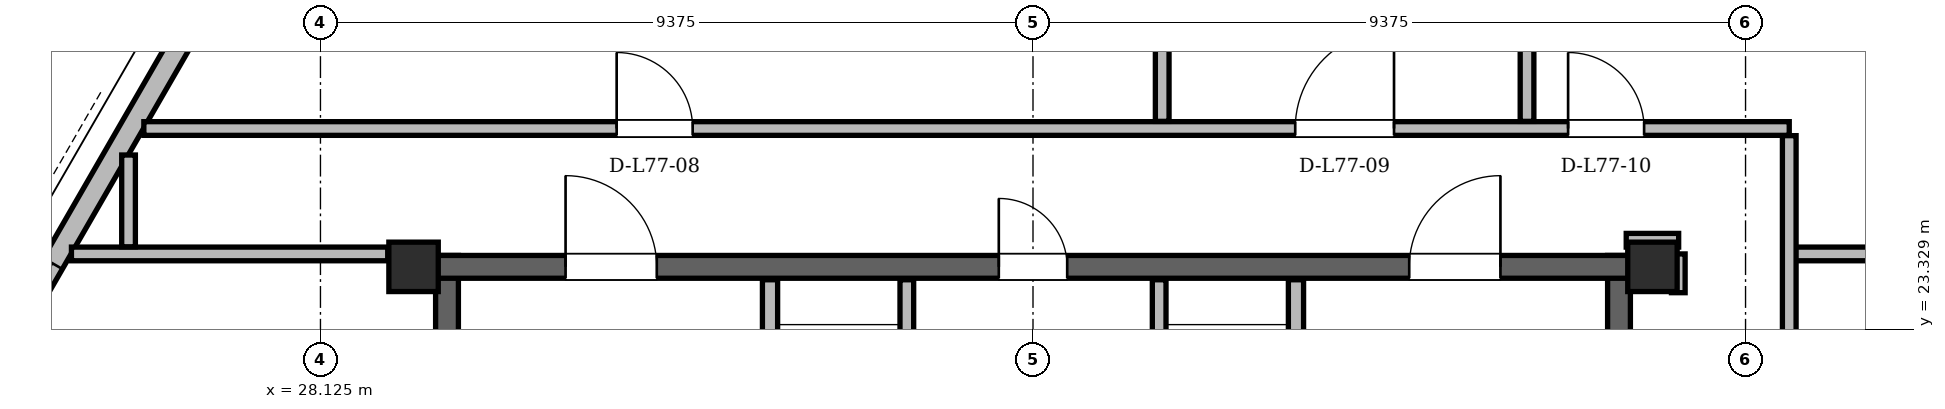
"""IFC4 building model, lengths in metres.
Left out: names, types, materials, properties, quantities, classifications, styles, units other than length and angle.
Written with IfcOpenShell. Run it as: python <this file> out.ifc"""

import sys

from ifc_helpers import new_model, si_unit, direction, frame, frame_2d, origin, origin_2d, place, context, subcontext, project, spatial, rectangle, hollow_rectangle, extrude, element, fill, save


model = new_model("IFC4")
c1 = context("Model", 3, precision=1e-05, world=origin(), true_north=direction((0.0, 1.0)))
c2 = subcontext(c1, "Body", "Model", "MODEL_VIEW")
j1 = project(units=[si_unit("LENGTHUNIT", "METRE"), si_unit("PLANEANGLEUNIT", "RADIAN")], contexts=[c1])
p1 = place(None, origin())
s1 = spatial("IfcSite", under=j1, at=p1, CompositionType="ELEMENT")
p2 = place(p1, origin())
s2 = spatial("IfcBuilding", under=s1, at=p2, CompositionType="ELEMENT")
p3 = place(p2, frame((0.0, 0.0, 292.8)))
s3 = spatial("IfcBuildingStorey", under=s2, at=p3, CompositionType="ELEMENT", Elevation=292.8)
for number, where, z_axis, x_axis in (
    (1, (45.65, 24.15, 0.0), (0.0, 0.0, 1.0), (1.0, 0.0, 0.0)),
    (2, (29.35, 24.15, 0.0), (0.0, 0.0, 1.0), (1.0, 0.0, 0.0)),
):
    element("IfcColumn", number, at=place(p3, frame(where, z_axis=z_axis, x_axis=x_axis)), inside=s3, PredefinedType="COLUMN", context=c2, shape_type="SweptSolid", body=[
        extrude(hollow_rectangle(XDim=0.65, YDim=0.65, WallThickness=0.05, at=origin_2d()), origin(), (0.0, 0.0, 1.0), 3.9),
    ])
for number, where, z_axis, x_axis in (
    (3, (29.79, 11.0, 0.0), (0.0, 0.0, 1.0), (0.0, 1.0, 0.0)),
    (4, (45.21, 11.0, 0.0), (0.0, 0.0, 1.0), (0.0, 1.0, 0.0)),
):
    element("IfcWall", number, at=place(p3, frame(where, z_axis=z_axis, x_axis=x_axis)), inside=s3, PredefinedType="SHEAR", context=c2, shape_type="SweptSolid", body=[
        extrude(rectangle(XDim=13.3, YDim=0.3, at=frame_2d((6.65, 0.0))), origin(), (0.0, 0.0, 1.0), 3.68),
    ])
p4 = place(p3, frame((29.65, 24.15, 0.0), z_axis=(0.0, 0.0, 1.0), x_axis=(1.0, 0.0, 0.0)))
e5 = element("IfcWall", 5, at=p4, inside=s3, PredefinedType="SHEAR", context=c2, shape_type="SweptSolid", body=[
    extrude(rectangle(XDim=15.7, YDim=0.3, at=frame_2d((7.85, 0.0))), origin(), (0.0, 0.0, 1.0), 3.68),
])
p5 = place(p4, frame((1.7, 0.0, 0.0)))
e6 = element("IfcOpeningElement", 6, at=p5, cuts=e5, PredefinedType="OPENING", context=c2, shape_type="SweptSolid", body=[
    extrude(rectangle(XDim=1.2, YDim=2.2, at=frame_2d((0.6, 1.1))), frame((0.0, 0.15, 0.0), z_axis=(0.0, -1.0, 0.0), x_axis=(1.0, 0.0, 0.0)), (0.0, 0.0, 1.0), 0.3),
])
p6 = place(p4, frame((12.8, 0.0, 0.0)))
e7 = element("IfcOpeningElement", 7, at=p6, cuts=e5, PredefinedType="OPENING", context=c2, shape_type="SweptSolid", body=[
    extrude(rectangle(XDim=1.2, YDim=2.2, at=frame_2d((0.6, 1.1))), frame((0.0, 0.15, 0.0), z_axis=(0.0, -1.0, 0.0), x_axis=(1.0, 0.0, 0.0)), (0.0, 0.0, 1.0), 0.3),
])
p7 = place(p4, frame((7.4, 0.0, 0.0)))
e8 = element("IfcOpeningElement", 8, at=p7, cuts=e5, PredefinedType="OPENING", context=c2, shape_type="SweptSolid", body=[
    extrude(rectangle(XDim=0.9, YDim=2.05, at=frame_2d((0.45, 1.025))), frame((0.0, 0.15, 0.0), z_axis=(0.0, -1.0, 0.0), x_axis=(1.0, 0.0, 0.0)), (0.0, 0.0, 1.0), 0.3),
])
p8 = place(p3, frame((58.337, 10.439, 0.0), z_axis=(0.0, 0.0, 1.0), x_axis=(-0.499999767403, 0.866025538074, 0.0)))
e9 = element("IfcWall", 9, at=p8, inside=s3, PredefinedType="SOLIDWALL", context=c2, shape_type="SweptSolid", body=[
    extrude(rectangle(XDim=37.57, YDim=0.29, at=frame_2d((18.785, 0.0))), origin(), (0.0, 0.0, 1.0), 3.058),
])
p9 = place(p8, frame((8.034, 0.0, 0.0)))
e10 = element("IfcOpeningElement", 10, at=p9, cuts=e9, PredefinedType="OPENING", context=c2, shape_type="SweptSolid", body=[
    extrude(rectangle(XDim=1.5, YDim=2.2, at=frame_2d((0.75, 1.1))), frame((0.0, 0.145, 0.0), z_axis=(0.0, -1.0, 0.0), x_axis=(1.0, 0.0, 0.0)), (0.0, 0.0, 1.0), 0.29),
])
p10 = place(p8, frame((32.531, 0.0, 0.0)))
e11 = element("IfcOpeningElement", 11, at=p10, cuts=e9, PredefinedType="OPENING", context=c2, shape_type="SweptSolid", body=[
    extrude(rectangle(XDim=1.3, YDim=2.2, at=frame_2d((0.65, 1.1))), frame((0.0, 0.145, 0.0), z_axis=(0.0, -1.0, 0.0), x_axis=(1.0, 0.0, 0.0)), (0.0, 0.0, 1.0), 0.29),
])
p11 = place(p8, frame((0.916, 0.0, 0.85)))
e12 = element("IfcOpeningElement", 12, at=p11, cuts=e9, PredefinedType="OPENING", context=c2, shape_type="SweptSolid", body=[
    extrude(rectangle(XDim=1.2, YDim=1.48, at=frame_2d((0.6, 0.74))), frame((0.0, 0.145, 0.0), z_axis=(0.0, -1.0, 0.0), x_axis=(1.0, 0.0, 0.0)), (0.0, 0.0, 1.0), 0.29),
])
p12 = place(p8, frame((13.243, 0.0, 0.85)))
e13 = element("IfcOpeningElement", 13, at=p12, cuts=e9, PredefinedType="OPENING", context=c2, shape_type="SweptSolid", body=[
    extrude(rectangle(XDim=1.6, YDim=1.7, at=frame_2d((0.8, 0.85))), frame((0.0, 0.145, 0.0), z_axis=(0.0, -1.0, 0.0), x_axis=(1.0, 0.0, 0.0)), (0.0, 0.0, 1.0), 0.29),
])
p13 = place(p8, frame((2.444, 0.0, 0.85)))
e14 = element("IfcOpeningElement", 14, at=p13, cuts=e9, PredefinedType="OPENING", context=c2, shape_type="SweptSolid", body=[
    extrude(rectangle(XDim=1.2, YDim=1.48, at=frame_2d((0.6, 0.74))), frame((0.0, 0.145, 0.0), z_axis=(0.0, -1.0, 0.0), x_axis=(1.0, 0.0, 0.0)), (0.0, 0.0, 1.0), 0.29),
])
p14 = place(p8, frame((35.19, 0.0, 0.85)))
e15 = element("IfcOpeningElement", 15, at=p14, cuts=e9, PredefinedType="OPENING", context=c2, shape_type="SweptSolid", body=[
    extrude(rectangle(XDim=1.2, YDim=1.48, at=frame_2d((0.6, 0.74))), frame((0.0, 0.145, 0.0), z_axis=(0.0, -1.0, 0.0), x_axis=(1.0, 0.0, 0.0)), (0.0, 0.0, 1.0), 0.29),
])
p15 = place(p8, frame((17.528, 0.0, 0.85)))
e16 = element("IfcOpeningElement", 16, at=p15, cuts=e9, PredefinedType="OPENING", context=c2, shape_type="SweptSolid", body=[
    extrude(rectangle(XDim=2.5, YDim=2.098, at=frame_2d((1.25, 1.049))), frame((0.0, 0.145, 0.0), z_axis=(0.0, -1.0, 0.0), x_axis=(1.0, 0.0, 0.0)), (0.0, 0.0, 1.0), 0.29),
])
p16 = place(p8, frame((27.565, 0.0, 0.85)))
e17 = element("IfcOpeningElement", 17, at=p16, cuts=e9, PredefinedType="OPENING", context=c2, shape_type="SweptSolid", body=[
    extrude(rectangle(XDim=1.2, YDim=1.48, at=frame_2d((0.6, 0.74))), frame((0.0, 0.145, 0.0), z_axis=(0.0, -1.0, 0.0), x_axis=(1.0, 0.0, 0.0)), (0.0, 0.0, 1.0), 0.29),
])
p17 = place(p3, frame((35.448, 42.976, 0.0), z_axis=(0.0, 0.0, 1.0), x_axis=(-0.499999767403, -0.866025538074, 0.0)))
e18 = element("IfcWall", 18, at=p17, inside=s3, PredefinedType="SOLIDWALL", context=c2, shape_type="SweptSolid", body=[
    extrude(rectangle(XDim=37.57, YDim=0.29, at=frame_2d((18.785, 0.0))), origin(), (0.0, 0.0, 1.0), 3.058),
])
p18 = place(p17, frame((8.034, 0.0, 0.0)))
e19 = element("IfcOpeningElement", 19, at=p18, cuts=e18, PredefinedType="OPENING", context=c2, shape_type="SweptSolid", body=[
    extrude(rectangle(XDim=1.5, YDim=2.2, at=frame_2d((0.75, 1.1))), frame((0.0, 0.145, 0.0), z_axis=(0.0, -1.0, 0.0), x_axis=(1.0, 0.0, 0.0)), (0.0, 0.0, 1.0), 0.29),
])
p19 = place(p17, frame((32.431, 0.0, 0.0)))
e20 = element("IfcOpeningElement", 20, at=p19, cuts=e18, PredefinedType="OPENING", context=c2, shape_type="SweptSolid", body=[
    extrude(rectangle(XDim=1.5, YDim=2.2, at=frame_2d((0.75, 1.1))), frame((0.0, 0.145, 0.0), z_axis=(0.0, -1.0, 0.0), x_axis=(1.0, 0.0, 0.0)), (0.0, 0.0, 1.0), 0.29),
])
p20 = place(p17, frame((27.302, 0.0, 0.85)))
e21 = element("IfcOpeningElement", 21, at=p20, cuts=e18, PredefinedType="OPENING", context=c2, shape_type="SweptSolid", body=[
    extrude(rectangle(XDim=2.2, YDim=1.85, at=frame_2d((1.1, 0.925))), frame((0.0, 0.145, 0.0), z_axis=(0.0, -1.0, 0.0), x_axis=(1.0, 0.0, 0.0)), (0.0, 0.0, 1.0), 0.29),
])
p21 = place(p17, frame((34.367, 0.0, 0.85)))
e22 = element("IfcOpeningElement", 22, at=p21, cuts=e18, PredefinedType="OPENING", context=c2, shape_type="SweptSolid", body=[
    extrude(rectangle(XDim=1.6, YDim=1.7, at=frame_2d((0.8, 0.85))), frame((0.0, 0.145, 0.0), z_axis=(0.0, -1.0, 0.0), x_axis=(1.0, 0.0, 0.0)), (0.0, 0.0, 1.0), 0.29),
])
p22 = place(p17, frame((21.688, 0.0, 0.85)))
e23 = element("IfcOpeningElement", 23, at=p22, cuts=e18, PredefinedType="OPENING", context=c2, shape_type="SweptSolid", body=[
    extrude(rectangle(XDim=1.2, YDim=1.48, at=frame_2d((0.6, 0.74))), frame((0.0, 0.145, 0.0), z_axis=(0.0, -1.0, 0.0), x_axis=(1.0, 0.0, 0.0)), (0.0, 0.0, 1.0), 0.29),
])
p23 = place(p17, frame((23.938, 0.0, 0.85)))
e24 = element("IfcOpeningElement", 24, at=p23, cuts=e18, PredefinedType="OPENING", context=c2, shape_type="SweptSolid", body=[
    extrude(rectangle(XDim=1.4, YDim=1.6, at=frame_2d((0.7, 0.8))), frame((0.0, 0.145, 0.0), z_axis=(0.0, -1.0, 0.0), x_axis=(1.0, 0.0, 0.0)), (0.0, 0.0, 1.0), 0.29),
])
p24 = place(p17, frame((15.363, 0.0, 0.85)))
e25 = element("IfcOpeningElement", 25, at=p24, cuts=e18, PredefinedType="OPENING", context=c2, shape_type="SweptSolid", body=[
    extrude(rectangle(XDim=2.4, YDim=1.9, at=frame_2d((1.2, 0.95))), frame((0.0, 0.145, 0.0), z_axis=(0.0, -1.0, 0.0), x_axis=(1.0, 0.0, 0.0)), (0.0, 0.0, 1.0), 0.29),
])
p25 = place(p17, frame((1.165, 0.0, 0.85)))
e26 = element("IfcOpeningElement", 26, at=p25, cuts=e18, PredefinedType="OPENING", context=c2, shape_type="SweptSolid", body=[
    extrude(rectangle(XDim=1.2, YDim=1.48, at=frame_2d((0.6, 0.74))), frame((0.0, 0.145, 0.0), z_axis=(0.0, -1.0, 0.0), x_axis=(1.0, 0.0, 0.0)), (0.0, 0.0, 1.0), 0.29),
])
p26 = place(p3, frame((34.04, 19.48, 0.0), z_axis=(0.0, 0.0, 1.0), x_axis=(0.0, 1.0, 0.0)))
e27 = element("IfcWall", 27, at=p26, inside=s3, PredefinedType="PARTITIONING", context=c2, shape_type="SweptSolid", body=[
    extrude(rectangle(XDim=4.5, YDim=0.2, at=frame_2d((2.25, 0.0))), origin(), (0.0, 0.0, 1.0), 3.68),
])
p27 = place(p26, frame((2.12, 0.0, 0.0)))
e28 = element("IfcOpeningElement", 28, at=p27, cuts=e27, PredefinedType="OPENING", context=c2, shape_type="SweptSolid", body=[
    extrude(rectangle(XDim=1.1, YDim=2.2, at=frame_2d((0.55, 1.1))), frame((0.0, 0.1, 0.0), z_axis=(0.0, -1.0, 0.0), x_axis=(1.0, 0.0, 0.0)), (0.0, 0.0, 1.0), 0.2),
])
p28 = place(p3, frame((35.84, 20.96, 0.0), z_axis=(0.0, 0.0, 1.0), x_axis=(0.0, 1.0, 0.0)))
e29 = element("IfcWall", 29, at=p28, inside=s3, PredefinedType="PARTITIONING", context=c2, shape_type="SweptSolid", body=[
    extrude(rectangle(XDim=3.02, YDim=0.18, at=frame_2d((1.51, 0.0))), origin(), (0.0, 0.0, 1.0), 3.68),
])
p29 = place(p3, frame((40.96, 19.48, 0.0), z_axis=(0.0, 0.0, 1.0), x_axis=(0.0, 1.0, 0.0)))
e30 = element("IfcWall", 30, at=p29, inside=s3, PredefinedType="PARTITIONING", context=c2, shape_type="SweptSolid", body=[
    extrude(rectangle(XDim=4.5, YDim=0.2, at=frame_2d((2.25, 0.0))), origin(), (0.0, 0.0, 1.0), 3.68),
])
p30 = place(p29, frame((2.12, 0.0, 0.0)))
e31 = element("IfcOpeningElement", 31, at=p30, cuts=e30, PredefinedType="OPENING", context=c2, shape_type="SweptSolid", body=[
    extrude(rectangle(XDim=1.1, YDim=2.2, at=frame_2d((0.55, 1.1))), frame((0.0, 0.1, 0.0), z_axis=(0.0, -1.0, 0.0), x_axis=(1.0, 0.0, 0.0)), (0.0, 0.0, 1.0), 0.2),
])
p31 = place(p3, frame((39.16, 20.96, 0.0), z_axis=(0.0, 0.0, 1.0), x_axis=(0.0, 1.0, 0.0)))
e32 = element("IfcWall", 32, at=p31, inside=s3, PredefinedType="PARTITIONING", context=c2, shape_type="SweptSolid", body=[
    extrude(rectangle(XDim=3.02, YDim=0.18, at=frame_2d((1.51, 0.0))), origin(), (0.0, 0.0, 1.0), 3.68),
])
p32 = place(p3, frame((24.849, 24.32, 0.0), z_axis=(0.0, 0.0, 1.0), x_axis=(1.0, 0.0, 0.0)))
e33 = element("IfcWall", 33, at=p32, inside=s3, PredefinedType="PARTITIONING", context=c2, shape_type="SweptSolid", body=[
    extrude(rectangle(XDim=4.161, YDim=0.18, at=frame_2d((2.081, 0.0))), origin(), (0.0, 0.0, 1.0), 3.68),
])
p33 = place(p3, frame((47.45, 24.32, 0.0), z_axis=(0.0, 0.0, 1.0), x_axis=(1.0, 0.0, 0.0)))
e34 = element("IfcWall", 34, at=p33, inside=s3, PredefinedType="PARTITIONING", context=c2, shape_type="SweptSolid", body=[
    extrude(rectangle(XDim=2.701, YDim=0.18, at=frame_2d((1.351, 0.0))), origin(), (0.0, 0.0, 1.0), 3.68),
])
p34 = place(p3, frame((45.305, 24.5, 0.0), z_axis=(0.0, 0.0, 1.0), x_axis=(1.0, 0.0, 0.0)))
e35 = element("IfcWall", 35, at=p34, inside=s3, PredefinedType="PARTITIONING", context=c2, shape_type="SweptSolid", body=[
    extrude(rectangle(XDim=0.69, YDim=0.18, at=frame_2d((0.345, 0.0))), origin(), (0.0, 0.0, 1.0), 3.266),
])
p35 = place(p3, frame((25.801, 25.97, 0.0), z_axis=(0.0, 0.0, 1.0), x_axis=(1.0, 0.0, 0.0)))
e36 = element("IfcWall", 36, at=p35, inside=s3, PredefinedType="PARTITIONING", context=c2, shape_type="SweptSolid", body=[
    extrude(rectangle(XDim=21.649, YDim=0.18, at=frame_2d((10.824, 0.0))), origin(), (0.0, 0.0, 1.0), 3.266),
])
p36 = place(p35, frame((6.221, 0.0, 0.0)))
e37 = element("IfcOpeningElement", 37, at=p36, cuts=e36, PredefinedType="OPENING", context=c2, shape_type="SweptSolid", body=[
    extrude(rectangle(XDim=1.0, YDim=2.18, at=frame_2d((0.5, 1.09))), frame((0.0, 0.09, 0.0), z_axis=(0.0, -1.0, 0.0), x_axis=(1.0, 0.0, 0.0)), (0.0, 0.0, 1.0), 0.18),
])
p37 = place(p35, frame((15.149, 0.0, 0.0)))
e38 = element("IfcOpeningElement", 38, at=p37, cuts=e36, PredefinedType="OPENING", context=c2, shape_type="SweptSolid", body=[
    extrude(rectangle(XDim=1.3, YDim=2.2, at=frame_2d((0.65, 1.1))), frame((0.0, 0.09, 0.0), z_axis=(0.0, -1.0, 0.0), x_axis=(1.0, 0.0, 0.0)), (0.0, 0.0, 1.0), 0.18),
])
p38 = place(p35, frame((18.739, 0.0, 0.0)))
e39 = element("IfcOpeningElement", 39, at=p38, cuts=e36, PredefinedType="OPENING", context=c2, shape_type="SweptSolid", body=[
    extrude(rectangle(XDim=1.0, YDim=2.18, at=frame_2d((0.5, 1.09))), frame((0.0, 0.09, 0.0), z_axis=(0.0, -1.0, 0.0), x_axis=(1.0, 0.0, 0.0)), (0.0, 0.0, 1.0), 0.18),
])
p39 = place(p3, frame((25.6, 24.414, 0.0), z_axis=(0.0, 0.0, 1.0), x_axis=(0.0, 1.0, 0.0)))
e40 = element("IfcWall", 40, at=p39, inside=s3, PredefinedType="PARTITIONING", context=c2, shape_type="SweptSolid", body=[
    extrude(rectangle(XDim=1.207, YDim=0.18, at=frame_2d((0.604, 0.0))), origin(), (0.0, 0.0, 1.0), 3.058),
])
p40 = place(p3, frame((39.2, 26.064, 0.0), z_axis=(0.0, 0.0, 1.0), x_axis=(0.0, 1.0, 0.0)))
e41 = element("IfcWall", 41, at=p40, inside=s3, PredefinedType="PARTITIONING", context=c2, shape_type="SweptSolid", body=[
    extrude(rectangle(XDim=4.312, YDim=0.18, at=frame_2d((2.156, 0.0))), origin(), (0.0, 0.0, 1.0), 3.68),
])
p41 = place(p3, frame((44.0, 26.064, 0.0), z_axis=(0.0, 0.0, 1.0), x_axis=(0.0, 1.0, 0.0)))
e42 = element("IfcWall", 42, at=p41, inside=s3, PredefinedType="PARTITIONING", context=c2, shape_type="SweptSolid", body=[
    extrude(rectangle(XDim=4.312, YDim=0.18, at=frame_2d((2.156, 0.0))), origin(), (0.0, 0.0, 1.0), 3.266),
])
p42 = place(p3, frame((45.99, 23.81, 0.0), z_axis=(0.0, 0.0, 1.0), x_axis=(0.0, 1.0, 0.0)))
e43 = element("IfcWall", 43, at=p42, inside=s3, PredefinedType="PARTITIONING", context=c2, shape_type="SweptSolid", body=[
    extrude(rectangle(XDim=0.51, YDim=0.18, at=frame_2d((0.255, 0.0))), origin(), (0.0, 0.0, 1.0), 3.68),
])
p43 = place(p3, frame((47.45, 9.394, 0.0), z_axis=(0.0, 0.0, 1.0), x_axis=(0.0, 1.0, 0.0)))
e44 = element("IfcWall", 44, at=p43, inside=s3, PredefinedType="PARTITIONING", context=c2, shape_type="SweptSolid", body=[
    extrude(rectangle(XDim=16.482, YDim=0.18, at=frame_2d((8.241, 0.0))), origin(), (0.0, 0.0, 1.0), 3.266),
])
p44 = place(p43, frame((9.343, 0.0, 0.0)))
e45 = element("IfcOpeningElement", 45, at=p44, cuts=e44, PredefinedType="OPENING", context=c2, shape_type="SweptSolid", body=[
    extrude(rectangle(XDim=1.0, YDim=2.18, at=frame_2d((0.5, 1.09))), frame((0.0, 0.09, 0.0), z_axis=(0.0, -1.0, 0.0), x_axis=(1.0, 0.0, 0.0)), (0.0, 0.0, 1.0), 0.18),
])
p45 = place(p15, origin())
e46 = element("IfcWindow", 46, at=p45, inside=s3, PartitioningType="SINGLE_PANEL", PredefinedType="WINDOW", context=c2, shape_type="SweptSolid", body=[
    extrude(rectangle(XDim=2.5, YDim=2.098, at=frame_2d((1.25, 1.049))), frame((0.0, 0.03, 0.0), z_axis=(0.0, -1.0, 0.0), x_axis=(1.0, 0.0, 0.0)), (0.0, 0.0, 1.0), 0.06),
])
fill(e16, e46)
p46 = place(p22, origin())
e47 = element("IfcWindow", 47, at=p46, inside=s3, PartitioningType="SINGLE_PANEL", PredefinedType="WINDOW", context=c2, shape_type="SweptSolid", body=[
    extrude(rectangle(XDim=1.2, YDim=1.48, at=frame_2d((0.6, 0.74))), frame((0.0, 0.03, 0.0), z_axis=(0.0, -1.0, 0.0), x_axis=(1.0, 0.0, 0.0)), (0.0, 0.0, 1.0), 0.06),
])
fill(e23, e47)
p47 = place(p5, origin())
e48 = element("IfcDoor", 48, at=p47, inside=s3, OperationType="SINGLE_SWING_LEFT", PredefinedType="DOOR", context=c2, shape_type="SweptSolid", body=[
    extrude(rectangle(XDim=1.2, YDim=2.2, at=frame_2d((0.6, 1.1))), frame((0.0, 0.025, 0.0), z_axis=(0.0, -1.0, 0.0), x_axis=(1.0, 0.0, 0.0)), (0.0, 0.0, 1.0), 0.05),
])
fill(e6, e48)
p48 = place(p6, origin())
e49 = element("IfcDoor", 49, at=p48, inside=s3, OperationType="SINGLE_SWING_RIGHT", PredefinedType="DOOR", context=c2, shape_type="SweptSolid", body=[
    extrude(rectangle(XDim=1.2, YDim=2.2, at=frame_2d((0.6, 1.1))), frame((0.0, 0.025, 0.0), z_axis=(0.0, -1.0, 0.0), x_axis=(1.0, 0.0, 0.0)), (0.0, 0.0, 1.0), 0.05),
])
fill(e7, e49)
p49 = place(p7, origin())
e50 = element("IfcDoor", 50, at=p49, inside=s3, OperationType="SINGLE_SWING_LEFT", PredefinedType="DOOR", context=c2, shape_type="SweptSolid", body=[
    extrude(rectangle(XDim=0.9, YDim=2.05, at=frame_2d((0.45, 1.025))), frame((0.0, 0.025, 0.0), z_axis=(0.0, -1.0, 0.0), x_axis=(1.0, 0.0, 0.0)), (0.0, 0.0, 1.0), 0.05),
])
fill(e8, e50)
p50 = place(p36, origin())
e51 = element("IfcDoor", 51, at=p50, inside=s3, OperationType="SINGLE_SWING_LEFT", PredefinedType="DOOR", context=c2, shape_type="SweptSolid", body=[
    extrude(rectangle(XDim=1.0, YDim=2.18, at=frame_2d((0.5, 1.09))), frame((0.0, 0.025, 0.0), z_axis=(0.0, -1.0, 0.0), x_axis=(1.0, 0.0, 0.0)), (0.0, 0.0, 1.0), 0.05),
])
fill(e37, e51)
p51 = place(p37, origin())
e52 = element("IfcDoor", 52, at=p51, inside=s3, OperationType="SINGLE_SWING_RIGHT", PredefinedType="DOOR", context=c2, shape_type="SweptSolid", body=[
    extrude(rectangle(XDim=1.3, YDim=2.2, at=frame_2d((0.65, 1.1))), frame((0.0, 0.025, 0.0), z_axis=(0.0, -1.0, 0.0), x_axis=(1.0, 0.0, 0.0)), (0.0, 0.0, 1.0), 0.05),
])
fill(e38, e52)
p52 = place(p38, origin())
e53 = element("IfcDoor", 53, at=p52, inside=s3, OperationType="SINGLE_SWING_LEFT", PredefinedType="DOOR", context=c2, shape_type="SweptSolid", body=[
    extrude(rectangle(XDim=1.0, YDim=2.18, at=frame_2d((0.5, 1.09))), frame((0.0, 0.025, 0.0), z_axis=(0.0, -1.0, 0.0), x_axis=(1.0, 0.0, 0.0)), (0.0, 0.0, 1.0), 0.05),
])
fill(e39, e53)
save(model, sys.argv[1])
